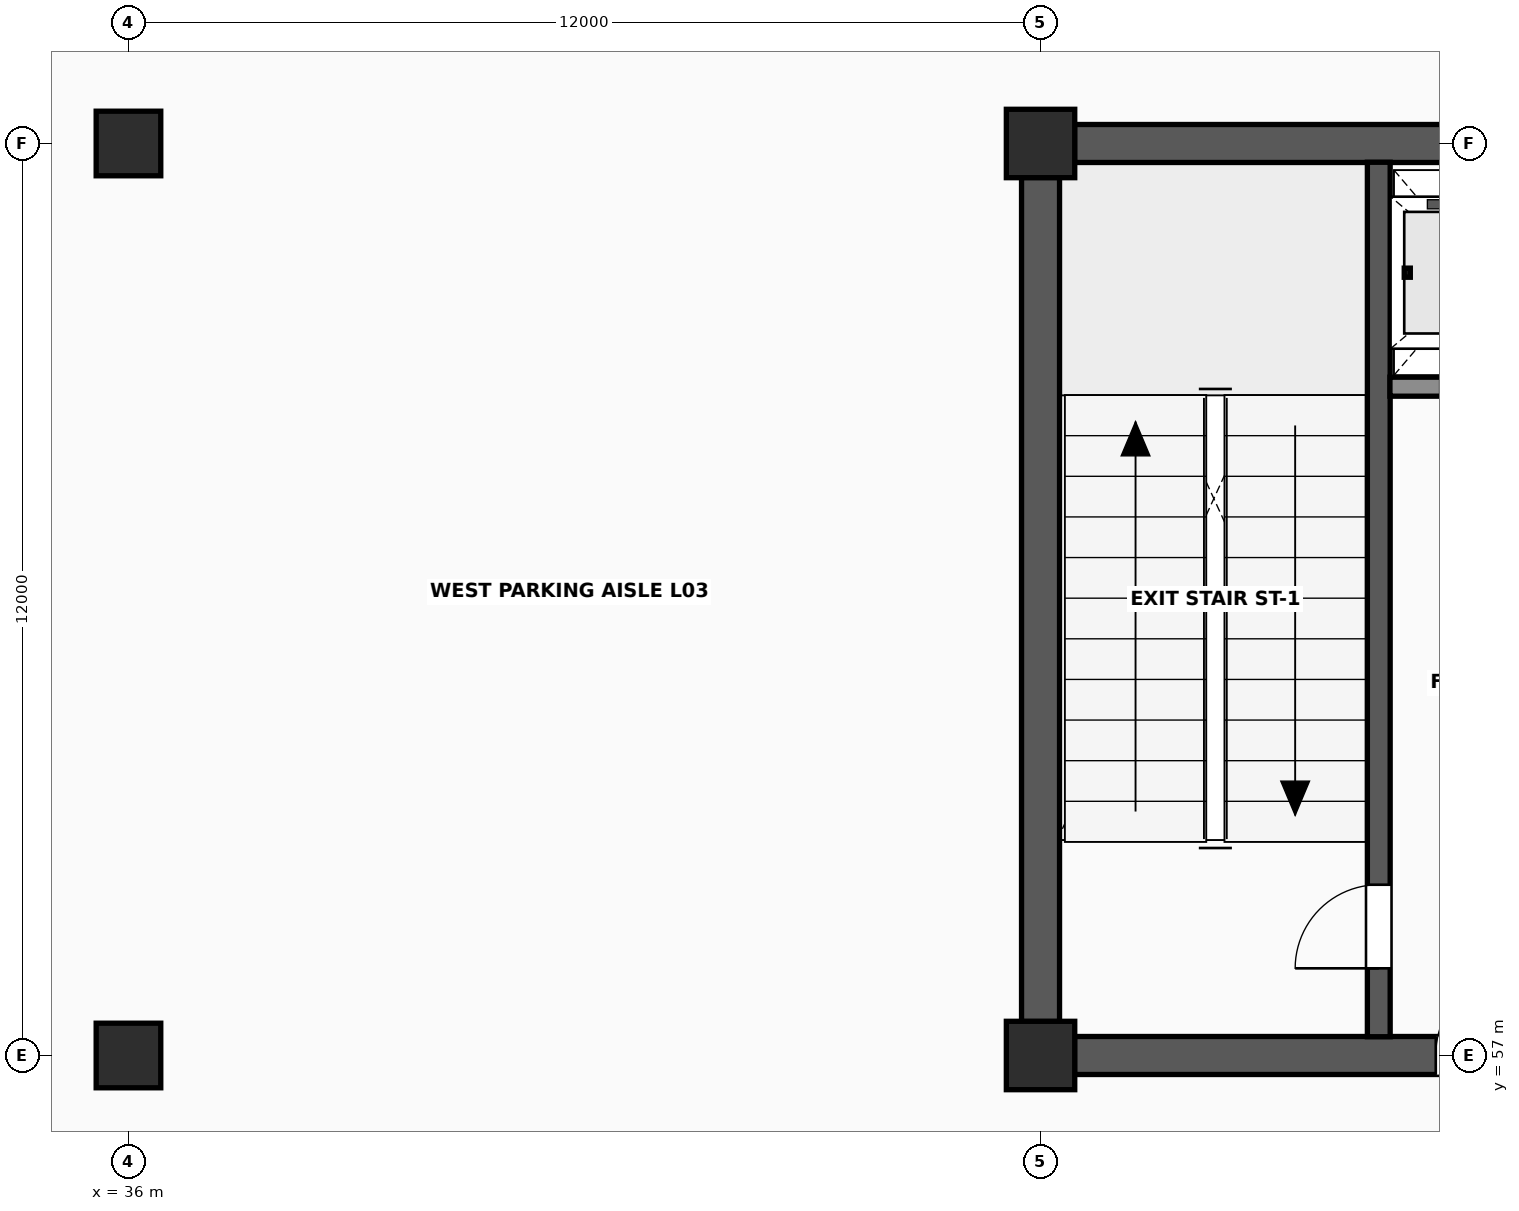
"""IFC4 building model, lengths in metres.
Left out: names, types, materials, properties, quantities, classifications, styles, units other than length and angle.
Written with IfcOpenShell. Run it as: python <this file> out.ifc"""

import sys

from ifc_helpers import new_model, si_unit, direction, frame, frame_2d, origin, origin_2d, place, context, subcontext, project, spatial, rectangle, extrude, element, fill, save


model = new_model("IFC4")
c1 = context("Model", 3, precision=1e-05, world=origin(), true_north=direction((0.0, 1.0)))
c2 = subcontext(c1, "Body", "Model", "MODEL_VIEW")
j1 = project(units=[si_unit("LENGTHUNIT", "METRE"), si_unit("PLANEANGLEUNIT", "RADIAN")], contexts=[c1])
p1 = place(None, origin())
s1 = spatial("IfcSite", under=j1, at=p1, CompositionType="ELEMENT")
p2 = place(p1, origin())
s2 = spatial("IfcBuilding", under=s1, at=p2, CompositionType="ELEMENT")
p3 = place(p2, frame((0.0, 0.0, 13.4)))
s3 = spatial("IfcBuildingStorey", under=s2, at=p3, CompositionType="ELEMENT", Elevation=13.4)
for number, where, z_axis, x_axis in (
    (1, (36.0, 57.0, 0.0), (0.0, 0.0, 1.0), (1.0, 0.0, 0.0)),
    (2, (36.0, 69.0, 0.0), (0.0, 0.0, 1.0), (1.0, 0.0, 0.0)),
):
    element("IfcColumn", number, at=place(p3, frame(where, z_axis=z_axis, x_axis=x_axis)), inside=s3, PredefinedType="COLUMN", context=c2, shape_type="SweptSolid", body=[
        extrude(rectangle(XDim=0.85, YDim=0.85, at=origin_2d()), origin(), (0.0, 0.0, 1.0), 3.8),
    ])
for number, where, z_axis, x_axis in (
    (3, (48.0, 57.0, 0.0), (0.0, 0.0, 1.0), (1.0, 0.0, 0.0)),
    (4, (48.0, 69.0, 0.0), (0.0, 0.0, 1.0), (1.0, 0.0, 0.0)),
):
    element("IfcColumn", number, at=place(p3, frame(where, z_axis=z_axis, x_axis=x_axis)), inside=s3, PredefinedType="COLUMN", context=c2, shape_type="SweptSolid", body=[
        extrude(rectangle(XDim=0.9, YDim=0.9, at=origin_2d()), origin(), (0.0, 0.0, 1.0), 3.8),
    ])
p4 = place(p3, frame((48.447, 57.0, 0.0), z_axis=(0.0, 0.0, 1.0), x_axis=(1.0, 0.0, 0.0)))
e5 = element("IfcWall", 5, at=p4, inside=s3, PredefinedType="SHEAR", context=c2, shape_type="SweptSolid", body=[
    extrude(rectangle(XDim=11.106, YDim=0.5, at=frame_2d((5.553, 0.0))), origin(), (0.0, 0.0, 1.0), 3.618),
])
p5 = place(p4, frame((4.753, 0.0, 0.0)))
e6 = element("IfcOpeningElement", 6, at=p5, cuts=e5, PredefinedType="OPENING", context=c2, shape_type="SweptSolid", body=[
    extrude(rectangle(XDim=1.2, YDim=2.2, at=frame_2d((0.6, 1.1))), frame((0.0, 0.265, 0.0), z_axis=(0.0, -1.0, 0.0), x_axis=(1.0, 0.0, 0.0)), (0.0, 0.0, 1.0), 0.53),
])
p6 = place(p4, frame((8.453, 0.0, 0.0)))
e7 = element("IfcOpeningElement", 7, at=p6, cuts=e5, PredefinedType="OPENING", context=c2, shape_type="SweptSolid", body=[
    extrude(rectangle(XDim=1.5, YDim=2.25, at=frame_2d((0.75, 1.125))), frame((0.0, 0.265, 0.0), z_axis=(0.0, -1.0, 0.0), x_axis=(1.0, 0.0, 0.0)), (0.0, 0.0, 1.0), 0.53),
])
for number, where, z_axis, x_axis in (
    (8, (48.447, 69.0, 0.0), (0.0, 0.0, 1.0), (1.0, 0.0, 0.0)),
    (9, (48.0, 57.447, 0.0), (0.0, 0.0, 1.0), (0.0, 1.0, 0.0)),
):
    element("IfcWall", number, at=place(p3, frame(where, z_axis=z_axis, x_axis=x_axis)), inside=s3, PredefinedType="SHEAR", context=c2, shape_type="SweptSolid", body=[
        extrude(rectangle(XDim=11.106, YDim=0.5, at=frame_2d((5.553, 0.0))), origin(), (0.0, 0.0, 1.0), 3.618),
    ])
p7 = place(p3, frame((52.45, 57.247, 0.0), z_axis=(0.0, 0.0, 1.0), x_axis=(0.0, 1.0, 0.0)))
e10 = element("IfcWall", 10, at=p7, inside=s3, PredefinedType="SHEAR", context=c2, shape_type="SweptSolid", body=[
    extrude(rectangle(XDim=11.506, YDim=0.3, at=frame_2d((5.753, 0.0))), origin(), (0.0, 0.0, 1.0), 3.618),
])
p8 = place(p7, frame((0.9, 0.0, 0.0)))
e11 = element("IfcOpeningElement", 11, at=p8, cuts=e10, PredefinedType="OPENING", context=c2, shape_type="SweptSolid", body=[
    extrude(rectangle(XDim=1.1, YDim=2.2, at=frame_2d((0.55, 1.1))), frame((0.0, 0.165, 0.0), z_axis=(0.0, -1.0, 0.0), x_axis=(1.0, 0.0, 0.0)), (0.0, 0.0, 1.0), 0.33),
])
p9 = place(p3, frame((52.597, 65.8, 0.0), z_axis=(0.0, 0.0, 1.0), x_axis=(1.0, 0.0, 0.0)))
e12 = element("IfcWall", 12, at=p9, inside=s3, PredefinedType="SOLIDWALL", context=c2, shape_type="SweptSolid", body=[
    extrude(rectangle(XDim=7.156, YDim=0.25, at=frame_2d((3.578, 0.0))), origin(), (0.0, 0.0, 1.0), 3.618),
])
p10 = place(p9, frame((0.653, 0.0, 0.0)))
e13 = element("IfcOpeningElement", 13, at=p10, cuts=e12, PredefinedType="OPENING", context=c2, shape_type="SweptSolid", body=[
    extrude(rectangle(XDim=1.1, YDim=2.24, at=frame_2d((0.55, 1.12))), frame((0.0, 0.14, 0.0), z_axis=(0.0, -1.0, 0.0), x_axis=(1.0, 0.0, 0.0)), (0.0, 0.0, 1.0), 0.28),
])
p11 = place(p9, frame((3.153, 0.0, 0.0)))
e14 = element("IfcOpeningElement", 14, at=p11, cuts=e12, PredefinedType="OPENING", context=c2, shape_type="SweptSolid", body=[
    extrude(rectangle(XDim=1.05, YDim=2.2, at=frame_2d((0.525, 1.1))), frame((0.0, 0.14, 0.0), z_axis=(0.0, -1.0, 0.0), x_axis=(1.0, 0.0, 0.0)), (0.0, 0.0, 1.0), 0.28),
])
p12 = place(p9, frame((5.528, 0.0, 0.0)))
e15 = element("IfcOpeningElement", 15, at=p12, cuts=e12, PredefinedType="OPENING", context=c2, shape_type="SweptSolid", body=[
    extrude(rectangle(XDim=1.05, YDim=2.2, at=frame_2d((0.525, 1.1))), frame((0.0, 0.14, 0.0), z_axis=(0.0, -1.0, 0.0), x_axis=(1.0, 0.0, 0.0)), (0.0, 0.0, 1.0), 0.28),
])
p13 = place(p8, origin())
e16 = element("IfcDoor", 16, at=p13, inside=s3, OperationType="SINGLE_SWING_LEFT", PredefinedType="DOOR", context=c2, shape_type="SweptSolid", body=[
    extrude(rectangle(XDim=1.1, YDim=2.2, at=frame_2d((0.55, 1.1))), frame((0.0, 0.025, 0.0), z_axis=(0.0, -1.0, 0.0), x_axis=(1.0, 0.0, 0.0)), (0.0, 0.0, 1.0), 0.05),
])
fill(e11, e16)
p14 = place(p5, origin())
e17 = element("IfcDoor", 17, at=p14, inside=s3, OperationType="SINGLE_SWING_RIGHT", PredefinedType="DOOR", context=c2, shape_type="SweptSolid", body=[
    extrude(rectangle(XDim=1.2, YDim=2.2, at=frame_2d((0.6, 1.1))), frame((0.0, 0.025, 0.0), z_axis=(0.0, -1.0, 0.0), x_axis=(1.0, 0.0, 0.0)), (0.0, 0.0, 1.0), 0.05),
])
fill(e6, e17)
save(model, sys.argv[1])
